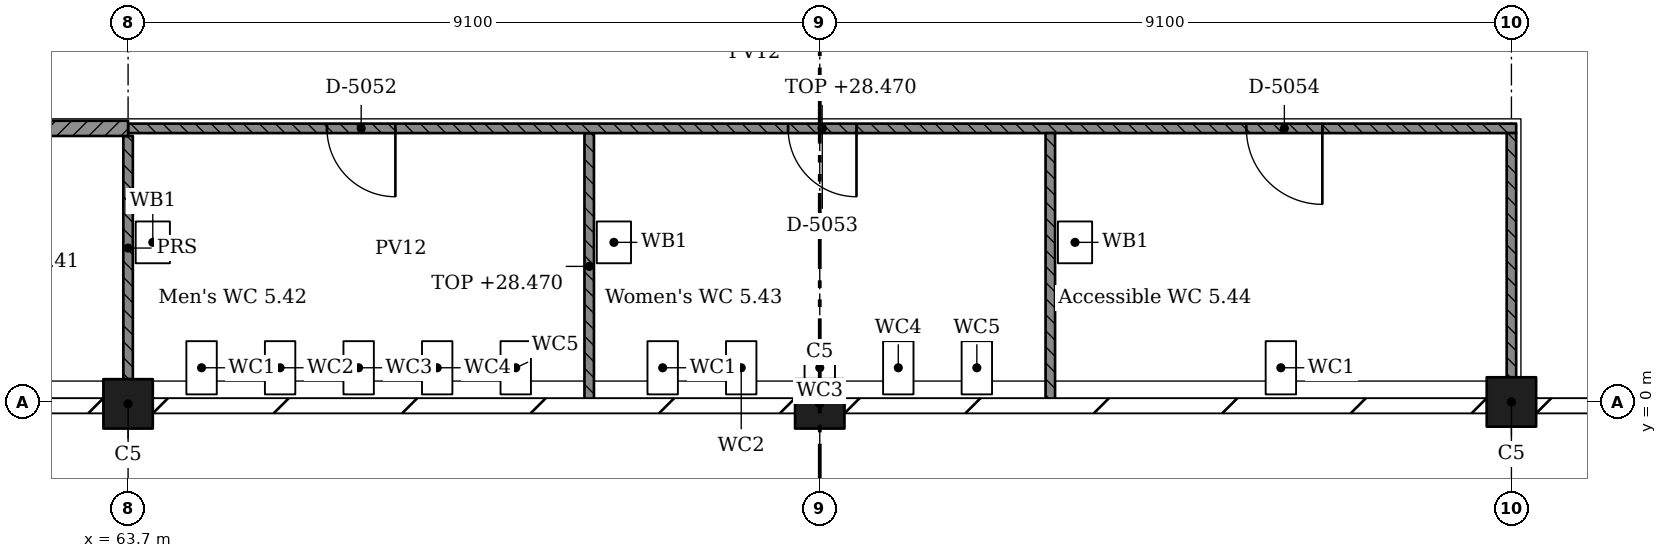
"""IFC4 building model, lengths in metres.
Left out: names, types, materials, properties, quantities, classifications, styles, units other than length and angle.
Written with IfcOpenShell. Run it as: python <this file> out.ifc"""

import sys

from ifc_helpers import new_model, si_unit, direction, frame, frame_2d, origin, origin_2d, place, context, subcontext, project, spatial, rectangle, extrude, element, fill, save


model = new_model("IFC4")
c1 = context("Model", 3, precision=1e-05, world=origin(), true_north=direction((0.0, 1.0)))
c2 = subcontext(c1, "Body", "Model", "MODEL_VIEW")
j1 = project(units=[si_unit("LENGTHUNIT", "METRE"), si_unit("PLANEANGLEUNIT", "RADIAN")], contexts=[c1])
p1 = place(None, origin())
s1 = spatial("IfcSite", under=j1, at=p1, CompositionType="ELEMENT")
p2 = place(p1, origin())
s2 = spatial("IfcBuilding", under=s1, at=p2, CompositionType="ELEMENT")
p3 = place(p2, frame((0.0, 0.0, 24.57)))
s3 = spatial("IfcBuildingStorey", under=s2, at=p3, CompositionType="ELEMENT", Elevation=24.57)
for number, where, z_axis, x_axis in (
    (1, (63.7, -0.025, 0.0), (0.0, 0.0, 1.0), (1.0, 0.0, 0.0)),
    (2, (72.8, -0.025, 0.0), (0.0, 0.0, 1.0), (1.0, 0.0, 0.0)),
    (3, (81.9, 0.0, 0.0), (0.0, 0.0, 1.0), (1.0, 0.0, 0.0)),
):
    element("IfcColumn", number, at=place(p3, frame(where, z_axis=z_axis, x_axis=x_axis)), inside=s3, PredefinedType="COLUMN", context=c2, shape_type="SweptSolid", body=[
        extrude(rectangle(XDim=0.65, YDim=0.65, at=origin_2d()), origin(), (0.0, 0.0, 1.0), 4.55),
    ])
p4 = place(p3, frame((63.7, 3.5, 0.0), z_axis=(0.0, 0.0, 1.0), x_axis=(0.0, -1.0, 0.0)))
e4 = element("IfcWall", 4, at=p4, inside=s3, PredefinedType="PARTITIONING", context=c2, shape_type="SweptSolid", body=[
    extrude(rectangle(XDim=3.2, YDim=0.125, at=frame_2d((1.6, 0.0))), origin(), (0.0, 0.0, 1.0), 3.9),
])
p5 = place(p3, frame((63.7, 3.6, 0.0), z_axis=(0.0, 0.0, 1.0), x_axis=(-1.0, 0.0, 0.0)))
e5 = element("IfcWall", 5, at=p5, inside=s3, PredefinedType="PARTITIONING", context=c2, shape_type="SweptSolid", body=[
    extrude(rectangle(XDim=18.3, YDim=0.2, at=frame_2d((9.15, 0.0))), origin(), (0.0, 0.0, 1.0), 3.9),
])
p6 = place(p5, frame((8.25, 0.0, 0.0)))
e6 = element("IfcOpeningElement", 6, at=p6, cuts=e5, PredefinedType="OPENING", context=c2, shape_type="SweptSolid", body=[
    extrude(rectangle(XDim=1.8, YDim=2.1, at=frame_2d((0.9, 1.05))), frame((0.0, 0.11, 0.0), z_axis=(0.0, -1.0, 0.0), x_axis=(1.0, 0.0, 0.0)), (0.0, 0.0, 1.0), 0.22),
])
p7 = place(p3, frame((69.767, 3.538, 0.0), z_axis=(0.0, 0.0, 1.0), x_axis=(0.0, -1.0, 0.0)))
e7 = element("IfcWall", 7, at=p7, inside=s3, PredefinedType="PARTITIONING", context=c2, shape_type="SweptSolid", body=[
    extrude(rectangle(XDim=3.508, YDim=0.125, at=frame_2d((1.754, 0.0))), origin(), (0.0, 0.0, 1.0), 3.9),
])
p8 = place(p3, frame((63.7, 3.6, 0.0), z_axis=(0.0, 0.0, 1.0), x_axis=(1.0, 0.0, 0.0)))
e8 = element("IfcWall", 8, at=p8, inside=s3, PredefinedType="PARTITIONING", context=c2, shape_type="SweptSolid", body=[
    extrude(rectangle(XDim=18.262, YDim=0.125, at=frame_2d((9.131, 0.0))), origin(), (0.0, 0.0, 1.0), 3.9),
])
p9 = place(p8, frame((2.617, 0.0, 0.0)))
e9 = element("IfcOpeningElement", 9, at=p9, cuts=e8, PredefinedType="OPENING", context=c2, shape_type="SweptSolid", body=[
    extrude(rectangle(XDim=0.9, YDim=2.1, at=frame_2d((0.45, 1.05))), frame((0.0, 0.073, 0.0), z_axis=(0.0, -1.0, 0.0), x_axis=(1.0, 0.0, 0.0)), (0.0, 0.0, 1.0), 0.145),
])
p10 = place(p8, frame((8.683, 0.0, 0.0)))
e10 = element("IfcOpeningElement", 10, at=p10, cuts=e8, PredefinedType="OPENING", context=c2, shape_type="SweptSolid", body=[
    extrude(rectangle(XDim=0.9, YDim=2.1, at=frame_2d((0.45, 1.05))), frame((0.0, 0.073, 0.0), z_axis=(0.0, -1.0, 0.0), x_axis=(1.0, 0.0, 0.0)), (0.0, 0.0, 1.0), 0.145),
])
p11 = place(p8, frame((14.712, 0.0, 0.0)))
e11 = element("IfcOpeningElement", 11, at=p11, cuts=e8, PredefinedType="OPENING", context=c2, shape_type="SweptSolid", body=[
    extrude(rectangle(XDim=1.0, YDim=2.1, at=frame_2d((0.5, 1.05))), frame((0.0, 0.073, 0.0), z_axis=(0.0, -1.0, 0.0), x_axis=(1.0, 0.0, 0.0)), (0.0, 0.0, 1.0), 0.145),
])
p12 = place(p3, frame((75.833, 3.538, 0.0), z_axis=(0.0, 0.0, 1.0), x_axis=(0.0, -1.0, 0.0)))
e12 = element("IfcWall", 12, at=p12, inside=s3, PredefinedType="PARTITIONING", context=c2, shape_type="SweptSolid", body=[
    extrude(rectangle(XDim=3.508, YDim=0.125, at=frame_2d((1.754, 0.0))), origin(), (0.0, 0.0, 1.0), 3.9),
])
p13 = place(p3, frame((81.9, 0.325, 0.0), z_axis=(0.0, 0.0, 1.0), x_axis=(0.0, 1.0, 0.0)))
e13 = element("IfcWall", 13, at=p13, inside=s3, PredefinedType="PARTITIONING", context=c2, shape_type="SweptSolid", body=[
    extrude(rectangle(XDim=3.213, YDim=0.125, at=frame_2d((1.606, 0.0))), origin(), (0.0, 0.0, 1.0), 3.9),
])
p14 = place(p9, origin())
e14 = element("IfcDoor", 14, at=p14, inside=s3, OperationType="SINGLE_SWING_RIGHT", PredefinedType="DOOR", context=c2, shape_type="SweptSolid", body=[
    extrude(rectangle(XDim=0.9, YDim=2.1, at=frame_2d((0.45, 1.05))), frame((0.0, 0.025, 0.0), z_axis=(0.0, -1.0, 0.0), x_axis=(1.0, 0.0, 0.0)), (0.0, 0.0, 1.0), 0.05),
])
fill(e9, e14)
p15 = place(p10, origin())
e15 = element("IfcDoor", 15, at=p15, inside=s3, OperationType="SINGLE_SWING_RIGHT", PredefinedType="DOOR", context=c2, shape_type="SweptSolid", body=[
    extrude(rectangle(XDim=0.9, YDim=2.1, at=frame_2d((0.45, 1.05))), frame((0.0, 0.025, 0.0), z_axis=(0.0, -1.0, 0.0), x_axis=(1.0, 0.0, 0.0)), (0.0, 0.0, 1.0), 0.05),
])
fill(e10, e15)
p16 = place(p11, origin())
e16 = element("IfcDoor", 16, at=p16, inside=s3, OperationType="SINGLE_SWING_RIGHT", PredefinedType="DOOR", context=c2, shape_type="SweptSolid", body=[
    extrude(rectangle(XDim=1.0, YDim=2.1, at=frame_2d((0.5, 1.05))), frame((0.0, 0.025, 0.0), z_axis=(0.0, -1.0, 0.0), x_axis=(1.0, 0.0, 0.0)), (0.0, 0.0, 1.0), 0.05),
])
fill(e11, e16)
save(model, sys.argv[1])
